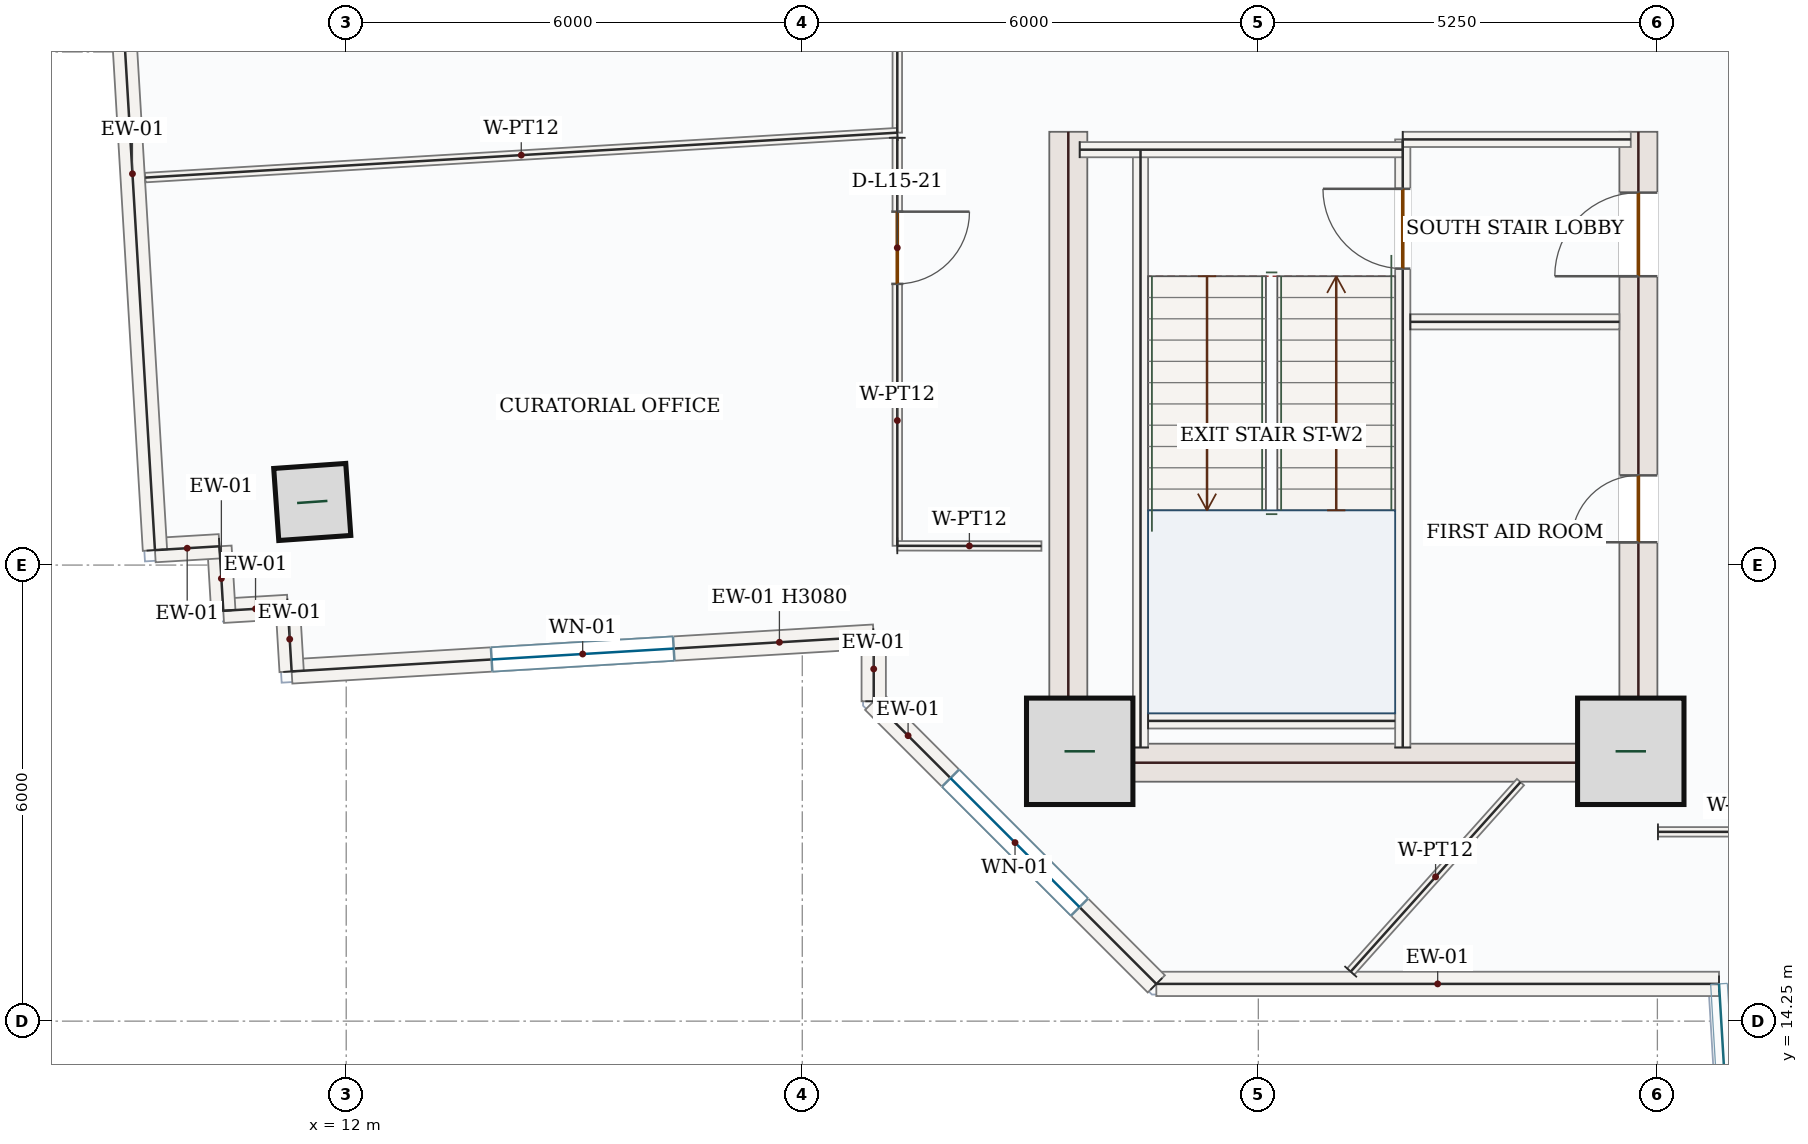
"""IFC4 building model, lengths in metres.
Left out: names, types, materials, properties, quantities, classifications, styles, units other than length and angle.
Written with IfcOpenShell. Run it as: python <this file> out.ifc"""

import sys

from ifc_helpers import new_model, si_unit, direction, frame, frame_2d, origin, origin_2d, place, context, subcontext, project, spatial, rectangle, hollow_rectangle, extrude, source, transform, mapped, element, fill, save


model = new_model("IFC4")
c1 = context("Model", 3, precision=1e-05, world=origin(), true_north=direction((0.0, 1.0)))
c2 = subcontext(c1, "Body", "Model", "MODEL_VIEW")
j1 = project(units=[si_unit("LENGTHUNIT", "METRE"), si_unit("PLANEANGLEUNIT", "RADIAN")], contexts=[c1])
p1 = place(None, origin())
s1 = spatial("IfcSite", under=j1, at=p1, CompositionType="ELEMENT")
p2 = place(p1, origin())
s2 = spatial("IfcBuilding", under=s1, at=p2, CompositionType="ELEMENT")
p3 = place(p2, frame((0.0, 0.0, 71.1)))
s3 = spatial("IfcBuildingStorey", under=s2, at=p3, CompositionType="ELEMENT", Elevation=71.1)
m1 = source(origin(), c2, "Body", "SweptSolid", [
    extrude(rectangle(XDim=8.55, YDim=0.5, at=frame_2d((4.275, 0.0))), origin(), (0.0, 0.0, 1.0), 3.95),
])
p4 = place(p3, frame((21.5, 17.4, 0.0), z_axis=(0.0, 0.0, 1.0), x_axis=(0.0, 1.0, 0.0)))
e1 = element("IfcWall", 1, at=p4, inside=s3, PredefinedType="SHEAR", context=c2, shape_type="MappedRepresentation", body=[
    mapped(m1, transform((0.0, 0.0, 0.0), x_axis=(1.0, 0.0, 0.0), y_axis=(0.0, 1.0, 0.0), z_axis=(0.0, 0.0, 1.0), scale=1.0)),
])
p5 = place(p3, frame((29.0, 17.4, 0.0), z_axis=(0.0, 0.0, 1.0), x_axis=(0.0, 1.0, 0.0)))
e2 = element("IfcWall", 2, at=p5, inside=s3, PredefinedType="SHEAR", context=c2, shape_type="SweptSolid", body=[
    extrude(rectangle(XDim=8.55, YDim=0.5, at=frame_2d((4.275, 0.0))), origin(), (0.0, 0.0, 1.0), 3.95),
])
p6 = place(p5, frame((6.65, 0.0, 0.0)))
e3 = element("IfcOpeningElement", 3, at=p6, cuts=e2, PredefinedType="OPENING", context=c2, shape_type="SweptSolid", body=[
    extrude(rectangle(XDim=1.1, YDim=2.2, at=frame_2d((0.55, 1.1))), frame((0.0, 0.26, 0.0), z_axis=(0.0, -1.0, 0.0), x_axis=(1.0, 0.0, 0.0)), (0.0, 0.0, 1.0), 0.52),
])
p7 = place(p5, frame((3.15, 0.0, 0.0)))
e4 = element("IfcOpeningElement", 4, at=p7, cuts=e2, PredefinedType="OPENING", context=c2, shape_type="SweptSolid", body=[
    extrude(rectangle(XDim=0.88, YDim=2.1, at=frame_2d((0.44, 1.05))), frame((0.0, 0.26, 0.0), z_axis=(0.0, -1.0, 0.0), x_axis=(1.0, 0.0, 0.0)), (0.0, 0.0, 1.0), 0.52),
])
m2 = source(origin(), c2, "Body", "SweptSolid", [
    extrude(rectangle(XDim=7.0, YDim=0.5, at=frame_2d((3.5, 0.0))), origin(), (0.0, 0.0, 1.0), 3.95),
])
p8 = place(p3, frame((21.75, 17.65, 0.0), z_axis=(0.0, 0.0, 1.0), x_axis=(1.0, 0.0, 0.0)))
e5 = element("IfcWall", 5, at=p8, inside=s3, PredefinedType="SHEAR", context=c2, shape_type="MappedRepresentation", body=[
    mapped(m2, transform((0.0, 0.0, 0.0), x_axis=(1.0, 0.0, 0.0), y_axis=(0.0, 1.0, 0.0), z_axis=(0.0, 0.0, 1.0), scale=1.0)),
])
m3 = source(origin(), c2, "Body", "SweptSolid", [
    extrude(rectangle(XDim=1.4, YDim=1.4, at=origin_2d()), origin(), (0.0, 0.0, 1.0), 4.2),
])
for number, where, z_axis, x_axis in (
    (6, (21.65, 17.8, 0.0), (0.0, 0.0, 1.0), (1.0, 0.0, 0.0)),
    (7, (28.9, 17.8, 0.0), (0.0, 0.0, 1.0), (1.0, 0.0, 0.0)),
):
    element("IfcColumn", number, at=place(p3, frame(where, z_axis=z_axis, x_axis=x_axis)), inside=s3, PredefinedType="COLUMN", context=c2, shape_type="MappedRepresentation", body=[
        mapped(m3, transform((0.0, 0.0, 0.0), x_axis=(1.0, 0.0, 0.0), y_axis=(0.0, 1.0, 0.0), z_axis=(0.0, 0.0, 1.0), scale=1.0)),
    ])
m4 = source(origin(), c2, "Body", "SweptSolid", [
    extrude(hollow_rectangle(XDim=0.95, YDim=0.95, WallThickness=0.05, at=origin_2d()), origin(), (0.0, 0.0, 1.0), 4.2),
])
p9 = place(p3, frame((11.553, 21.08, 0.0), z_axis=(0.0, 0.0, 1.0), x_axis=(0.99756405026, 0.069756473744, 0.0)))
e8 = element("IfcColumn", 8, at=p9, inside=s3, PredefinedType="COLUMN", context=c2, shape_type="MappedRepresentation", body=[
    mapped(m4, transform((0.0, 0.0, 0.0), x_axis=(1.0, 0.0, 0.0), y_axis=(0.0, 1.0, 0.0), z_axis=(0.0, 0.0, 1.0), scale=1.0)),
])
m5 = source(origin(), c2, "Body", "SweptSolid", [
    extrude(rectangle(XDim=7.403, YDim=0.32, at=frame_2d((3.701, 0.0))), origin(), (0.0, 0.0, 1.0), 3.95),
])
p10 = place(p3, frame((30.061, 14.74, 0.0), z_axis=(0.0, 0.0, 1.0), x_axis=(-1.0, 0.0, 0.0)))
e9 = element("IfcWall", 9, at=p10, inside=s3, PredefinedType="SOLIDWALL", context=c2, shape_type="MappedRepresentation", body=[
    mapped(m5, transform((0.0, 0.0, 0.0), x_axis=(1.0, 0.0, 0.0), y_axis=(0.0, 1.0, 0.0), z_axis=(0.0, 0.0, 1.0), scale=1.0)),
])
p11 = place(p3, frame((22.658, 14.74, 0.0), z_axis=(0.0, 0.0, 1.0), x_axis=(-0.707106781187, 0.707106781187, 0.0)))
e10 = element("IfcWall", 10, at=p11, inside=s3, PredefinedType="SOLIDWALL", context=c2, shape_type="SweptSolid", body=[
    extrude(rectangle(XDim=5.258, YDim=0.32, at=frame_2d((2.629, 0.0))), origin(), (0.0, 0.0, 1.0), 3.95),
])
p12 = place(p11, frame((1.429, 0.0, 0.85)))
e11 = element("IfcOpeningElement", 11, at=p12, cuts=e10, PredefinedType="OPENING", context=c2, shape_type="SweptSolid", body=[
    extrude(rectangle(XDim=2.4, YDim=1.8, at=frame_2d((1.2, 0.9))), frame((0.0, 0.17, 0.0), z_axis=(0.0, -1.0, 0.0), x_axis=(1.0, 0.0, 0.0)), (0.0, 0.0, 1.0), 0.34),
])
m6 = source(origin(), c2, "Body", "SweptSolid", [
    extrude(rectangle(XDim=0.851, YDim=0.32, at=frame_2d((0.425, 0.0))), origin(), (0.0, 0.0, 1.0), 3.95),
])
p13 = place(p3, frame((18.94, 18.458, 0.0), z_axis=(0.0, 0.0, 1.0), x_axis=(0.0, 1.0, 0.0)))
e12 = element("IfcWall", 12, at=p13, inside=s3, PredefinedType="SOLIDWALL", context=c2, shape_type="MappedRepresentation", body=[
    mapped(m6, transform((0.0, 0.0, 0.0), x_axis=(1.0, 0.0, 0.0), y_axis=(0.0, 1.0, 0.0), z_axis=(0.0, 0.0, 1.0), scale=1.0)),
])
p14 = place(p3, frame((18.94, 19.309, 0.0), z_axis=(0.0, 0.0, 1.0), x_axis=(-0.998218176762, -0.059669687296, 0.0)))
e13 = element("IfcWall", 13, at=p14, inside=s3, PredefinedType="SOLIDWALL", context=c2, shape_type="SweptSolid", body=[
    extrude(rectangle(XDim=7.672, YDim=0.32, at=frame_2d((3.836, 0.0))), origin(), (0.0, 0.0, 1.0), 3.08),
])
p15 = place(p14, frame((2.636, 0.0, 0.85)))
e14 = element("IfcOpeningElement", 14, at=p15, cuts=e13, PredefinedType="OPENING", context=c2, shape_type="SweptSolid", body=[
    extrude(rectangle(XDim=2.4, YDim=1.8, at=frame_2d((1.2, 0.9))), frame((0.0, 0.17, 0.0), z_axis=(0.0, -1.0, 0.0), x_axis=(1.0, 0.0, 0.0)), (0.0, 0.0, 1.0), 0.34),
])
m7 = source(origin(), c2, "Body", "SweptSolid", [
    extrude(rectangle(XDim=0.85, YDim=0.32, at=frame_2d((0.425, 0.0))), origin(), (0.0, 0.0, 1.0), 3.95),
])
for number, where, z_axis, x_axis in (
    (15, (11.282, 18.851, 0.0), (0.0, 0.0, 1.0), (-0.059, 0.998, 0.0)),
    (16, (11.231, 19.699, 0.0), (0.0, 0.0, 1.0), (-0.998, -0.06, 0.0)),
    (17, (10.383, 19.649, 0.0), (0.0, 0.0, 1.0), (-0.059, 0.998, 0.0)),
    (18, (10.332, 20.497, 0.0), (0.0, 0.0, 1.0), (-0.998, -0.06, 0.0)),
):
    element("IfcWall", number, at=place(p3, frame(where, z_axis=z_axis, x_axis=x_axis)), inside=s3, PredefinedType="SOLIDWALL", context=c2, shape_type="MappedRepresentation", body=[
        mapped(m7, transform((0.0, 0.0, 0.0), x_axis=(1.0, 0.0, 0.0), y_axis=(0.0, 1.0, 0.0), z_axis=(0.0, 0.0, 1.0), scale=1.0)),
    ])
m8 = source(origin(), c2, "Body", "SweptSolid", [
    extrude(rectangle(XDim=9.92, YDim=0.32, at=frame_2d((4.96, 0.0))), origin(), (0.0, 0.0, 1.0), 3.95),
])
p16 = place(p3, frame((9.484, 20.447, 0.0), z_axis=(0.0, 0.0, 1.0), x_axis=(-0.059656871726, 0.998218942745, 0.0)))
e19 = element("IfcWall", 19, at=p16, inside=s3, PredefinedType="SOLIDWALL", context=c2, shape_type="MappedRepresentation", body=[
    mapped(m8, transform((0.0, 0.0, 0.0), x_axis=(1.0, 0.0, 0.0), y_axis=(0.0, 1.0, 0.0), z_axis=(0.0, 0.0, 1.0), scale=1.0)),
])
m9 = source(origin(), c2, "Body", "SweptSolid", [
    extrude(rectangle(XDim=7.87, YDim=0.2, at=frame_2d((3.935, 0.0))), origin(), (0.0, 0.0, 1.0), 3.95),
])
p17 = place(p3, frame((22.45, 17.85, 0.0), z_axis=(0.0, 0.0, 1.0), x_axis=(0.0, 1.0, 0.0)))
e20 = element("IfcWall", 20, at=p17, inside=s3, PredefinedType="SOLIDWALL", context=c2, shape_type="MappedRepresentation", body=[
    mapped(m9, transform((0.0, 0.0, 0.0), x_axis=(1.0, 0.0, 0.0), y_axis=(0.0, 1.0, 0.0), z_axis=(0.0, 0.0, 1.0), scale=1.0)),
])
p18 = place(p3, frame((25.9, 17.85, 0.0), z_axis=(0.0, 0.0, 1.0), x_axis=(0.0, 1.0, 0.0)))
e21 = element("IfcWall", 21, at=p18, inside=s3, PredefinedType="SOLIDWALL", context=c2, shape_type="SweptSolid", body=[
    extrude(rectangle(XDim=8.0, YDim=0.2, at=frame_2d((4.0, 0.0))), origin(), (0.0, 0.0, 1.0), 3.95),
])
p19 = place(p18, frame((6.3, 0.0, 0.0)))
e22 = element("IfcOpeningElement", 22, at=p19, cuts=e21, PredefinedType="OPENING", context=c2, shape_type="SweptSolid", body=[
    extrude(rectangle(XDim=1.05, YDim=2.15, at=frame_2d((0.525, 1.075))), frame((0.0, 0.11, 0.0), z_axis=(0.0, -1.0, 0.0), x_axis=(1.0, 0.0, 0.0)), (0.0, 0.0, 1.0), 0.22),
])
m10 = source(origin(), c2, "Body", "SweptSolid", [
    extrude(rectangle(XDim=4.25, YDim=0.2, at=frame_2d((2.125, 0.0))), origin(), (0.0, 0.0, 1.0), 3.95),
])
p20 = place(p3, frame((21.65, 25.715, 0.0), z_axis=(0.0, 0.0, 1.0), x_axis=(1.0, 0.0, 0.0)))
e23 = element("IfcWall", 23, at=p20, inside=s3, PredefinedType="SOLIDWALL", context=c2, shape_type="MappedRepresentation", body=[
    mapped(m10, transform((0.0, 0.0, 0.0), x_axis=(1.0, 0.0, 0.0), y_axis=(0.0, 1.0, 0.0), z_axis=(0.0, 0.0, 1.0), scale=1.0)),
])
m11 = source(origin(), c2, "Body", "SweptSolid", [
    extrude(rectangle(XDim=3.0, YDim=0.2, at=frame_2d((1.5, 0.0))), origin(), (0.0, 0.0, 1.0), 3.95),
])
p21 = place(p3, frame((25.9, 25.85, 0.0), z_axis=(0.0, 0.0, 1.0), x_axis=(1.0, 0.0, 0.0)))
e24 = element("IfcWall", 24, at=p21, inside=s3, PredefinedType="SOLIDWALL", context=c2, shape_type="MappedRepresentation", body=[
    mapped(m11, transform((0.0, 0.0, 0.0), x_axis=(1.0, 0.0, 0.0), y_axis=(0.0, 1.0, 0.0), z_axis=(0.0, 0.0, 1.0), scale=1.0)),
])
m12 = source(origin(), c2, "Body", "SweptSolid", [
    extrude(rectangle(XDim=3.25, YDim=0.2, at=frame_2d((1.625, 0.0))), origin(), (0.0, 0.0, 1.0), 3.95),
])
p22 = place(p3, frame((22.55, 18.2, 0.0), z_axis=(0.0, 0.0, 1.0), x_axis=(1.0, 0.0, 0.0)))
e25 = element("IfcWall", 25, at=p22, inside=s3, PredefinedType="SOLIDWALL", context=c2, shape_type="MappedRepresentation", body=[
    mapped(m12, transform((0.0, 0.0, 0.0), x_axis=(1.0, 0.0, 0.0), y_axis=(0.0, 1.0, 0.0), z_axis=(0.0, 0.0, 1.0), scale=1.0)),
])
m13 = source(origin(), c2, "Body", "SweptSolid", [
    extrude(rectangle(XDim=2.75, YDim=0.2, at=frame_2d((1.375, 0.0))), origin(), (0.0, 0.0, 1.0), 3.95),
])
p23 = place(p3, frame((26.0, 23.45, 0.0), z_axis=(0.0, 0.0, 1.0), x_axis=(1.0, 0.0, 0.0)))
e26 = element("IfcWall", 26, at=p23, inside=s3, PredefinedType="SOLIDWALL", context=c2, shape_type="MappedRepresentation", body=[
    mapped(m13, transform((0.0, 0.0, 0.0), x_axis=(1.0, 0.0, 0.0), y_axis=(0.0, 1.0, 0.0), z_axis=(0.0, 0.0, 1.0), scale=1.0)),
])
p24 = place(p3, frame((29.258, 16.74, 0.0), z_axis=(0.0, 0.0, 1.0), x_axis=(0.999999998192, -6.0135907e-05, 0.0)))
e27 = element("IfcWall", 27, at=p24, inside=s3, PredefinedType="PARTITIONING", context=c2, shape_type="SweptSolid", body=[
    extrude(rectangle(XDim=4.06, YDim=0.125, at=frame_2d((2.03, 0.0))), origin(), (0.0, 0.0, 1.0), 3.95),
])
p25 = place(p24, frame((2.426, 0.0, 0.0)))
e28 = element("IfcOpeningElement", 28, at=p25, cuts=e27, PredefinedType="OPENING", context=c2, shape_type="SweptSolid", body=[
    extrude(rectangle(XDim=0.95, YDim=2.15, at=frame_2d((0.475, 1.075))), frame((0.0, 0.073, 0.0), z_axis=(0.0, -1.0, 0.0), x_axis=(1.0, 0.0, 0.0)), (0.0, 0.0, 1.0), 0.145),
])
m14 = source(origin(), c2, "Body", "SweptSolid", [
    extrude(rectangle(XDim=3.348, YDim=0.125, at=frame_2d((1.674, 0.0))), origin(), (0.0, 0.0, 1.0), 3.95),
])
p26 = place(p3, frame((25.215, 14.901, 0.0), z_axis=(0.0, 0.0, 1.0), x_axis=(0.667206176518, 0.74487308853, 0.0)))
e29 = element("IfcWall", 29, at=p26, inside=s3, PredefinedType="PARTITIONING", context=c2, shape_type="MappedRepresentation", body=[
    mapped(m14, transform((0.0, 0.0, 0.0), x_axis=(1.0, 0.0, 0.0), y_axis=(0.0, 1.0, 0.0), z_axis=(0.0, 0.0, 1.0), scale=1.0)),
])
p27 = place(p3, frame((19.253, 33.497, 0.0), z_axis=(0.0, 0.0, 1.0), x_axis=(-0.000355308612, -0.999999936878, 0.0)))
e30 = element("IfcWall", 30, at=p27, inside=s3, PredefinedType="PARTITIONING", context=c2, shape_type="SweptSolid", body=[
    extrude(rectangle(XDim=7.558, YDim=0.125, at=frame_2d((3.779, 0.0))), origin(), (0.0, 0.0, 1.0), 3.95),
])
p28 = place(p27, frame((5.155, 0.0, 0.0)))
e31 = element("IfcOpeningElement", 31, at=p28, cuts=e30, PredefinedType="OPENING", context=c2, shape_type="SweptSolid", body=[
    extrude(rectangle(XDim=0.95, YDim=2.15, at=frame_2d((0.475, 1.075))), frame((0.0, 0.073, 0.0), z_axis=(0.0, -1.0, 0.0), x_axis=(1.0, 0.0, 0.0)), (0.0, 0.0, 1.0), 0.145),
])
m15 = source(origin(), c2, "Body", "SweptSolid", [
    extrude(rectangle(XDim=9.911, YDim=0.125, at=frame_2d((4.956, 0.0))), origin(), (0.0, 0.0, 1.0), 3.95),
])
p29 = place(p3, frame((19.25, 25.939, 0.0), z_axis=(0.0, 0.0, 1.0), x_axis=(-0.998218808208, -0.05965912285, 0.0)))
e32 = element("IfcWall", 32, at=p29, inside=s3, PredefinedType="PARTITIONING", context=c2, shape_type="MappedRepresentation", body=[
    mapped(m15, transform((0.0, 0.0, 0.0), x_axis=(1.0, 0.0, 0.0), y_axis=(0.0, 1.0, 0.0), z_axis=(0.0, 0.0, 1.0), scale=1.0)),
])
p30 = place(p3, frame((19.25, 25.871, 0.0), z_axis=(0.0, 0.0, 1.0), x_axis=(9.0962841e-05, -0.999999995863, 0.0)))
e33 = element("IfcWall", 33, at=p30, inside=s3, PredefinedType="PARTITIONING", context=c2, shape_type="SweptSolid", body=[
    extrude(rectangle(XDim=5.368, YDim=0.125, at=frame_2d((2.684, 0.0))), origin(), (0.0, 0.0, 1.0), 3.95),
])
p31 = place(p30, frame((0.972, 0.0, 0.0)))
e34 = element("IfcOpeningElement", 34, at=p31, cuts=e33, PredefinedType="OPENING", context=c2, shape_type="SweptSolid", body=[
    extrude(rectangle(XDim=0.95, YDim=2.15, at=frame_2d((0.475, 1.075))), frame((0.0, 0.073, 0.0), z_axis=(0.0, -1.0, 0.0), x_axis=(1.0, 0.0, 0.0)), (0.0, 0.0, 1.0), 0.145),
])
m16 = source(origin(), c2, "Body", "SweptSolid", [
    extrude(rectangle(XDim=1.896, YDim=0.125, at=frame_2d((0.948, 0.0))), origin(), (0.0, 0.0, 1.0), 3.95),
])
p32 = place(p3, frame((19.25, 20.503, 0.0), z_axis=(0.0, 0.0, 1.0), x_axis=(0.999998806185, -0.001545195168, 0.0)))
e35 = element("IfcWall", 35, at=p32, inside=s3, PredefinedType="PARTITIONING", context=c2, shape_type="MappedRepresentation", body=[
    mapped(m16, transform((0.0, 0.0, 0.0), x_axis=(1.0, 0.0, 0.0), y_axis=(0.0, 1.0, 0.0), z_axis=(0.0, 0.0, 1.0), scale=1.0)),
])
m17 = source(origin(), c2, "Body", "SweptSolid", [
    extrude(rectangle(XDim=2.4, YDim=1.8, at=frame_2d((1.2, 0.9))), frame((0.0, 0.03, 0.0), z_axis=(0.0, -1.0, 0.0), x_axis=(1.0, 0.0, 0.0)), (0.0, 0.0, 1.0), 0.06),
])
p33 = place(p12, origin())
e36 = element("IfcWindow", 36, at=p33, inside=s3, PartitioningType="DOUBLE_PANEL_VERTICAL", PredefinedType="WINDOW", context=c2, shape_type="MappedRepresentation", body=[
    mapped(m17, transform((0.0, 0.0, 0.0), x_axis=(1.0, 0.0, 0.0), y_axis=(0.0, 1.0, 0.0), z_axis=(0.0, 0.0, 1.0), scale=1.0)),
])
fill(e11, e36)
p34 = place(p15, origin())
e37 = element("IfcWindow", 37, at=p34, inside=s3, PartitioningType="DOUBLE_PANEL_VERTICAL", PredefinedType="WINDOW", context=c2, shape_type="MappedRepresentation", body=[
    mapped(m17, transform((0.0, 0.0, 0.0), x_axis=(1.0, 0.0, 0.0), y_axis=(0.0, 1.0, 0.0), z_axis=(0.0, 0.0, 1.0), scale=1.0)),
])
fill(e14, e37)
m18 = source(origin(), c2, "Body", "SweptSolid", [
    extrude(rectangle(XDim=1.05, YDim=2.15, at=frame_2d((0.525, 1.075))), frame((0.0, 0.025, 0.0), z_axis=(0.0, -1.0, 0.0), x_axis=(1.0, 0.0, 0.0)), (0.0, 0.0, 1.0), 0.05),
])
p35 = place(p19, origin())
e38 = element("IfcDoor", 38, at=p35, inside=s3, OperationType="SINGLE_SWING_RIGHT", PredefinedType="DOOR", context=c2, shape_type="MappedRepresentation", body=[
    mapped(m18, transform((0.0, 0.0, 0.0), x_axis=(1.0, 0.0, 0.0), y_axis=(0.0, 1.0, 0.0), z_axis=(0.0, 0.0, 1.0), scale=1.0)),
])
fill(e22, e38)
m19 = source(origin(), c2, "Body", "SweptSolid", [
    extrude(rectangle(XDim=1.1, YDim=2.2, at=frame_2d((0.55, 1.1))), frame((0.0, 0.025, 0.0), z_axis=(0.0, -1.0, 0.0), x_axis=(1.0, 0.0, 0.0)), (0.0, 0.0, 1.0), 0.05),
])
p36 = place(p6, origin())
e39 = element("IfcDoor", 39, at=p36, inside=s3, OperationType="SINGLE_SWING_LEFT", PredefinedType="DOOR", context=c2, shape_type="MappedRepresentation", body=[
    mapped(m19, transform((0.0, 0.0, 0.0), x_axis=(1.0, 0.0, 0.0), y_axis=(0.0, 1.0, 0.0), z_axis=(0.0, 0.0, 1.0), scale=1.0)),
])
fill(e3, e39)
m20 = source(origin(), c2, "Body", "SweptSolid", [
    extrude(rectangle(XDim=0.88, YDim=2.1, at=frame_2d((0.44, 1.05))), frame((0.0, 0.025, 0.0), z_axis=(0.0, -1.0, 0.0), x_axis=(1.0, 0.0, 0.0)), (0.0, 0.0, 1.0), 0.05),
])
p37 = place(p7, origin())
e40 = element("IfcDoor", 40, at=p37, inside=s3, OperationType="SINGLE_SWING_LEFT", PredefinedType="DOOR", context=c2, shape_type="MappedRepresentation", body=[
    mapped(m20, transform((0.0, 0.0, 0.0), x_axis=(1.0, 0.0, 0.0), y_axis=(0.0, 1.0, 0.0), z_axis=(0.0, 0.0, 1.0), scale=1.0)),
])
fill(e4, e40)
m21 = source(origin(), c2, "Body", "SweptSolid", [
    extrude(rectangle(XDim=0.95, YDim=2.15, at=frame_2d((0.475, 1.075))), frame((0.0, 0.025, 0.0), z_axis=(0.0, -1.0, 0.0), x_axis=(1.0, 0.0, 0.0)), (0.0, 0.0, 1.0), 0.05),
])
p38 = place(p31, origin())
e41 = element("IfcDoor", 41, at=p38, inside=s3, OperationType="SINGLE_SWING_LEFT", PredefinedType="DOOR", context=c2, shape_type="MappedRepresentation", body=[
    mapped(m21, transform((0.0, 0.0, 0.0), x_axis=(1.0, 0.0, 0.0), y_axis=(0.0, 1.0, 0.0), z_axis=(0.0, 0.0, 1.0), scale=1.0)),
])
fill(e34, e41)
save(model, sys.argv[1])
